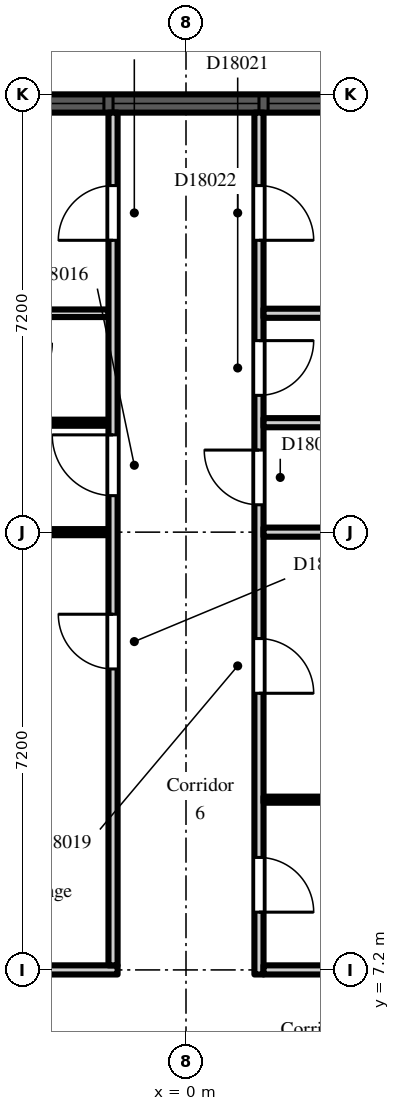
"""IFC4 building model, lengths in metres.
Left out: names, types, materials, properties, quantities, classifications, styles, units other than length and angle.
Written with IfcOpenShell. Run it as: python <this file> out.ifc"""

import sys

from ifc_helpers import new_model, si_unit, direction, frame, frame_2d, origin, place, context, subcontext, project, spatial, rectangle, extrude, element, fill, save


model = new_model("IFC4")
c1 = context("Model", 3, precision=1e-05, world=origin(), true_north=direction((0.0, 1.0)))
c2 = subcontext(c1, "Body", "Model", "MODEL_VIEW")
j1 = project(units=[si_unit("LENGTHUNIT", "METRE"), si_unit("PLANEANGLEUNIT", "RADIAN")], contexts=[c1])
p1 = place(None, origin())
s1 = spatial("IfcSite", under=j1, at=p1, CompositionType="ELEMENT")
p2 = place(p1, origin())
s2 = spatial("IfcBuilding", under=s1, at=p2, CompositionType="ELEMENT")
p3 = place(p2, frame((0.0, 0.0, 120.3)))
s3 = spatial("IfcBuildingStorey", under=s2, at=p3, CompositionType="ELEMENT", Elevation=120.3)
p4 = place(p3, frame((2.7, 21.45, 0.0), z_axis=(0.0, 0.0, 1.0), x_axis=(-1.0, 0.0, 0.0)))
e1 = element("IfcWall", 1, at=p4, inside=s3, PredefinedType="SOLIDWALL", context=c2, shape_type="SweptSolid", body=[
    extrude(rectangle(XDim=5.4, YDim=0.3, at=frame_2d((2.7, 0.0))), origin(), (0.0, 0.0, 1.0), 2.2),
])
p5 = place(p4, frame((1.5, 0.0, 0.2)))
e2 = element("IfcOpeningElement", 2, at=p5, cuts=e1, PredefinedType="OPENING", context=c2, shape_type="SweptSolid", body=[
    extrude(rectangle(XDim=2.4, YDim=1.85, at=frame_2d((1.2, 0.925))), frame((0.0, 0.16, 0.0), z_axis=(0.0, -1.0, 0.0), x_axis=(1.0, 0.0, 0.0)), (0.0, 0.0, 1.0), 0.32),
])
p6 = place(p4, frame((0.15, 0.0, 0.2)))
e3 = element("IfcOpeningElement", 3, at=p6, cuts=e1, PredefinedType="OPENING", context=c2, shape_type="SweptSolid", body=[
    extrude(rectangle(XDim=1.2, YDim=1.85, at=frame_2d((0.6, 0.925))), frame((0.0, 0.16, 0.0), z_axis=(0.0, -1.0, 0.0), x_axis=(1.0, 0.0, 0.0)), (0.0, 0.0, 1.0), 0.32),
])
p7 = place(p4, frame((4.05, 0.0, 0.2)))
e4 = element("IfcOpeningElement", 4, at=p7, cuts=e1, PredefinedType="OPENING", context=c2, shape_type="SweptSolid", body=[
    extrude(rectangle(XDim=1.2, YDim=1.85, at=frame_2d((0.6, 0.925))), frame((0.0, 0.16, 0.0), z_axis=(0.0, -1.0, 0.0), x_axis=(1.0, 0.0, 0.0)), (0.0, 0.0, 1.0), 0.32),
])
p8 = place(p3, frame((-3.9, 7.2, 0.0), z_axis=(0.0, 0.0, 1.0), x_axis=(1.0, 0.0, 0.0)))
e5 = element("IfcWall", 5, at=p8, inside=s3, PredefinedType="PARTITIONING", context=c2, shape_type="SweptSolid", body=[
    extrude(rectangle(XDim=2.775, YDim=0.15, at=frame_2d((1.387, 0.0))), origin(), (0.0, 0.0, 1.0), 2.6),
])
p9 = place(p3, frame((-3.9, 14.4, 0.0), z_axis=(0.0, 0.0, 1.0), x_axis=(1.0, 0.0, 0.0)))
e6 = element("IfcWall", 6, at=p9, inside=s3, PredefinedType="PARTITIONING", context=c2, shape_type="SweptSolid", body=[
    extrude(rectangle(XDim=2.625, YDim=0.1, at=frame_2d((1.312, 0.0))), origin(), (0.0, 0.0, 1.0), 2.6),
])
p10 = place(p3, frame((-2.95, 16.2, 0.0), z_axis=(0.0, 0.0, 1.0), x_axis=(1.0, 0.0, 0.0)))
e7 = element("IfcWall", 7, at=p10, inside=s3, PredefinedType="PARTITIONING", context=c2, shape_type="SweptSolid", body=[
    extrude(rectangle(XDim=1.675, YDim=0.1, at=frame_2d((0.837, 0.0))), origin(), (0.0, 0.0, 1.0), 2.6),
])
p11 = place(p3, frame((-3.0, 18.0, 0.0), z_axis=(0.0, 0.0, 1.0), x_axis=(1.0, 0.0, 0.0)))
e8 = element("IfcWall", 8, at=p11, inside=s3, PredefinedType="PARTITIONING", context=c2, shape_type="SweptSolid", body=[
    extrude(rectangle(XDim=1.725, YDim=0.125, at=frame_2d((0.863, 0.0))), origin(), (0.0, 0.0, 1.0), 2.6),
])
p12 = place(p3, frame((-1.2, 7.275, 0.0), z_axis=(0.0, 0.0, 1.0), x_axis=(0.0, 1.0, 0.0)))
e9 = element("IfcWall", 9, at=p12, inside=s3, PredefinedType="PARTITIONING", context=c2, shape_type="SweptSolid", body=[
    extrude(rectangle(XDim=14.025, YDim=0.15, at=frame_2d((7.013, 0.0))), origin(), (0.0, 0.0, 1.0), 2.6),
])
p13 = place(p12, frame((4.875, 0.0, 0.0)))
e10 = element("IfcOpeningElement", 10, at=p13, cuts=e9, PredefinedType="OPENING", context=c2, shape_type="SweptSolid", body=[
    extrude(rectangle(XDim=0.9, YDim=2.1, at=frame_2d((0.45, 1.05))), frame((0.0, 0.085, 0.0), z_axis=(0.0, -1.0, 0.0), x_axis=(1.0, 0.0, 0.0)), (0.0, 0.0, 1.0), 0.17),
])
p14 = place(p12, frame((7.725, 0.0, 0.0)))
e11 = element("IfcOpeningElement", 11, at=p14, cuts=e9, PredefinedType="OPENING", context=c2, shape_type="SweptSolid", body=[
    extrude(rectangle(XDim=1.0, YDim=2.1, at=frame_2d((0.5, 1.05))), frame((0.0, 0.085, 0.0), z_axis=(0.0, -1.0, 0.0), x_axis=(1.0, 0.0, 0.0)), (0.0, 0.0, 1.0), 0.17),
])
p15 = place(p12, frame((11.925, 0.0, 0.0)))
e12 = element("IfcOpeningElement", 12, at=p15, cuts=e9, PredefinedType="OPENING", context=c2, shape_type="SweptSolid", body=[
    extrude(rectangle(XDim=0.9, YDim=2.1, at=frame_2d((0.45, 1.05))), frame((0.0, 0.085, 0.0), z_axis=(0.0, -1.0, 0.0), x_axis=(1.0, 0.0, 0.0)), (0.0, 0.0, 1.0), 0.17),
])
p16 = place(p3, frame((1.2, 7.125, 0.0), z_axis=(0.0, 0.0, 1.0), x_axis=(0.0, 1.0, 0.0)))
e13 = element("IfcWall", 13, at=p16, inside=s3, PredefinedType="PARTITIONING", context=c2, shape_type="SweptSolid", body=[
    extrude(rectangle(XDim=14.175, YDim=0.15, at=frame_2d((7.087, 0.0))), origin(), (0.0, 0.0, 1.0), 2.6),
])
p17 = place(p16, frame((1.025, 0.0, 0.0)))
e14 = element("IfcOpeningElement", 14, at=p17, cuts=e13, PredefinedType="OPENING", context=c2, shape_type="SweptSolid", body=[
    extrude(rectangle(XDim=0.9, YDim=2.1, at=frame_2d((0.45, 1.05))), frame((0.0, 0.085, 0.0), z_axis=(0.0, -1.0, 0.0), x_axis=(1.0, 0.0, 0.0)), (0.0, 0.0, 1.0), 0.17),
])
p18 = place(p16, frame((4.625, 0.0, 0.0)))
e15 = element("IfcOpeningElement", 15, at=p18, cuts=e13, PredefinedType="OPENING", context=c2, shape_type="SweptSolid", body=[
    extrude(rectangle(XDim=0.9, YDim=2.1, at=frame_2d((0.45, 1.05))), frame((0.0, 0.085, 0.0), z_axis=(0.0, -1.0, 0.0), x_axis=(1.0, 0.0, 0.0)), (0.0, 0.0, 1.0), 0.17),
])
p19 = place(p16, frame((7.725, 0.0, 0.0)))
e16 = element("IfcOpeningElement", 16, at=p19, cuts=e13, PredefinedType="OPENING", context=c2, shape_type="SweptSolid", body=[
    extrude(rectangle(XDim=0.9, YDim=2.1, at=frame_2d((0.45, 1.05))), frame((0.0, 0.085, 0.0), z_axis=(0.0, -1.0, 0.0), x_axis=(1.0, 0.0, 0.0)), (0.0, 0.0, 1.0), 0.17),
])
p20 = place(p16, frame((9.525, 0.0, 0.0)))
e17 = element("IfcOpeningElement", 17, at=p20, cuts=e13, PredefinedType="OPENING", context=c2, shape_type="SweptSolid", body=[
    extrude(rectangle(XDim=0.9, YDim=2.1, at=frame_2d((0.45, 1.05))), frame((0.0, 0.085, 0.0), z_axis=(0.0, -1.0, 0.0), x_axis=(1.0, 0.0, 0.0)), (0.0, 0.0, 1.0), 0.17),
])
p21 = place(p16, frame((12.075, 0.0, 0.0)))
e18 = element("IfcOpeningElement", 18, at=p21, cuts=e13, PredefinedType="OPENING", context=c2, shape_type="SweptSolid", body=[
    extrude(rectangle(XDim=0.9, YDim=2.1, at=frame_2d((0.45, 1.05))), frame((0.0, 0.085, 0.0), z_axis=(0.0, -1.0, 0.0), x_axis=(1.0, 0.0, 0.0)), (0.0, 0.0, 1.0), 0.17),
])
p22 = place(p3, frame((1.275, 7.2, 0.0), z_axis=(0.0, 0.0, 1.0), x_axis=(1.0, 0.0, 0.0)))
e19 = element("IfcWall", 19, at=p22, inside=s3, PredefinedType="PARTITIONING", context=c2, shape_type="SweptSolid", body=[
    extrude(rectangle(XDim=2.625, YDim=0.15, at=frame_2d((1.312, 0.0))), origin(), (0.0, 0.0, 1.0), 2.6),
])
p23 = place(p3, frame((1.275, 10.0, 0.0), z_axis=(0.0, 0.0, 1.0), x_axis=(1.0, 0.0, 0.0)))
e20 = element("IfcWall", 20, at=p23, inside=s3, PredefinedType="PARTITIONING", context=c2, shape_type="SweptSolid", body=[
    extrude(rectangle(XDim=2.625, YDim=0.1, at=frame_2d((1.312, 0.0))), origin(), (0.0, 0.0, 1.0), 2.6),
])
p24 = place(p3, frame((1.275, 14.4, 0.0), z_axis=(0.0, 0.0, 1.0), x_axis=(1.0, 0.0, 0.0)))
e21 = element("IfcWall", 21, at=p24, inside=s3, PredefinedType="PARTITIONING", context=c2, shape_type="SweptSolid", body=[
    extrude(rectangle(XDim=2.625, YDim=0.15, at=frame_2d((1.312, 0.0))), origin(), (0.0, 0.0, 1.0), 2.6),
])
p25 = place(p3, frame((1.275, 16.2, 0.0), z_axis=(0.0, 0.0, 1.0), x_axis=(1.0, 0.0, 0.0)))
e22 = element("IfcWall", 22, at=p25, inside=s3, PredefinedType="PARTITIONING", context=c2, shape_type="SweptSolid", body=[
    extrude(rectangle(XDim=5.625, YDim=0.15, at=frame_2d((2.812, 0.0))), origin(), (0.0, 0.0, 1.0), 2.6),
])
p26 = place(p3, frame((1.275, 18.0, 0.0), z_axis=(0.0, 0.0, 1.0), x_axis=(1.0, 0.0, 0.0)))
e23 = element("IfcWall", 23, at=p26, inside=s3, PredefinedType="PARTITIONING", context=c2, shape_type="SweptSolid", body=[
    extrude(rectangle(XDim=3.825, YDim=0.15, at=frame_2d((1.913, 0.0))), origin(), (0.0, 0.0, 1.0), 2.6),
])
p27 = place(p5, origin())
e24 = element("IfcWindow", 24, at=p27, inside=s3, PartitioningType="SINGLE_PANEL", PredefinedType="WINDOW", context=c2, shape_type="SweptSolid", body=[
    extrude(rectangle(XDim=2.4, YDim=1.85, at=frame_2d((1.2, 0.925))), frame((0.0, 0.03, 0.0), z_axis=(0.0, -1.0, 0.0), x_axis=(1.0, 0.0, 0.0)), (0.0, 0.0, 1.0), 0.06),
])
fill(e2, e24)
p28 = place(p6, origin())
e25 = element("IfcWindow", 25, at=p28, inside=s3, PartitioningType="SINGLE_PANEL", PredefinedType="WINDOW", context=c2, shape_type="SweptSolid", body=[
    extrude(rectangle(XDim=1.2, YDim=1.85, at=frame_2d((0.6, 0.925))), frame((0.0, 0.03, 0.0), z_axis=(0.0, -1.0, 0.0), x_axis=(1.0, 0.0, 0.0)), (0.0, 0.0, 1.0), 0.06),
])
fill(e3, e25)
p29 = place(p7, origin())
e26 = element("IfcWindow", 26, at=p29, inside=s3, PartitioningType="SINGLE_PANEL", PredefinedType="WINDOW", context=c2, shape_type="SweptSolid", body=[
    extrude(rectangle(XDim=1.2, YDim=1.85, at=frame_2d((0.6, 0.925))), frame((0.0, 0.03, 0.0), z_axis=(0.0, -1.0, 0.0), x_axis=(1.0, 0.0, 0.0)), (0.0, 0.0, 1.0), 0.06),
])
fill(e4, e26)
p30 = place(p13, origin())
e27 = element("IfcDoor", 27, at=p30, inside=s3, OperationType="SINGLE_SWING_RIGHT", PredefinedType="DOOR", context=c2, shape_type="SweptSolid", body=[
    extrude(rectangle(XDim=0.9, YDim=2.1, at=frame_2d((0.45, 1.05))), frame((0.0, 0.025, 0.0), z_axis=(0.0, -1.0, 0.0), x_axis=(1.0, 0.0, 0.0)), (0.0, 0.0, 1.0), 0.05),
])
fill(e10, e27)
p31 = place(p14, origin())
e28 = element("IfcDoor", 28, at=p31, inside=s3, OperationType="SINGLE_SWING_RIGHT", PredefinedType="DOOR", context=c2, shape_type="SweptSolid", body=[
    extrude(rectangle(XDim=1.0, YDim=2.1, at=frame_2d((0.5, 1.05))), frame((0.0, 0.025, 0.0), z_axis=(0.0, -1.0, 0.0), x_axis=(1.0, 0.0, 0.0)), (0.0, 0.0, 1.0), 0.05),
])
fill(e11, e28)
p32 = place(p15, origin())
e29 = element("IfcDoor", 29, at=p32, inside=s3, OperationType="SINGLE_SWING_LEFT", PredefinedType="DOOR", context=c2, shape_type="SweptSolid", body=[
    extrude(rectangle(XDim=0.9, YDim=2.1, at=frame_2d((0.45, 1.05))), frame((0.0, 0.025, 0.0), z_axis=(0.0, -1.0, 0.0), x_axis=(1.0, 0.0, 0.0)), (0.0, 0.0, 1.0), 0.05),
])
fill(e12, e29)
p33 = place(p17, frame((0.9, 0.0, 0.0), z_axis=(0.0, 0.0, 1.0), x_axis=(-1.0, 0.0, 0.0)))
e30 = element("IfcDoor", 30, at=p33, inside=s3, OperationType="SINGLE_SWING_RIGHT", PredefinedType="DOOR", context=c2, shape_type="SweptSolid", body=[
    extrude(rectangle(XDim=0.9, YDim=2.1, at=frame_2d((0.45, 1.05))), frame((0.0, 0.025, 0.0), z_axis=(0.0, -1.0, 0.0), x_axis=(1.0, 0.0, 0.0)), (0.0, 0.0, 1.0), 0.05),
])
fill(e14, e30)
p34 = place(p18, frame((0.9, 0.0, 0.0), z_axis=(0.0, 0.0, 1.0), x_axis=(-1.0, 0.0, 0.0)))
e31 = element("IfcDoor", 31, at=p34, inside=s3, OperationType="SINGLE_SWING_RIGHT", PredefinedType="DOOR", context=c2, shape_type="SweptSolid", body=[
    extrude(rectangle(XDim=0.9, YDim=2.1, at=frame_2d((0.45, 1.05))), frame((0.0, 0.025, 0.0), z_axis=(0.0, -1.0, 0.0), x_axis=(1.0, 0.0, 0.0)), (0.0, 0.0, 1.0), 0.05),
])
fill(e15, e31)
p35 = place(p19, origin())
e32 = element("IfcDoor", 32, at=p35, inside=s3, OperationType="SINGLE_SWING_RIGHT", PredefinedType="DOOR", context=c2, shape_type="SweptSolid", body=[
    extrude(rectangle(XDim=0.9, YDim=2.1, at=frame_2d((0.45, 1.05))), frame((0.0, 0.025, 0.0), z_axis=(0.0, -1.0, 0.0), x_axis=(1.0, 0.0, 0.0)), (0.0, 0.0, 1.0), 0.05),
])
fill(e16, e32)
p36 = place(p20, frame((0.9, 0.0, 0.0), z_axis=(0.0, 0.0, 1.0), x_axis=(-1.0, 0.0, 0.0)))
e33 = element("IfcDoor", 33, at=p36, inside=s3, OperationType="SINGLE_SWING_LEFT", PredefinedType="DOOR", context=c2, shape_type="SweptSolid", body=[
    extrude(rectangle(XDim=0.9, YDim=2.1, at=frame_2d((0.45, 1.05))), frame((0.0, 0.025, 0.0), z_axis=(0.0, -1.0, 0.0), x_axis=(1.0, 0.0, 0.0)), (0.0, 0.0, 1.0), 0.05),
])
fill(e17, e33)
p37 = place(p21, frame((0.9, 0.0, 0.0), z_axis=(0.0, 0.0, 1.0), x_axis=(-1.0, 0.0, 0.0)))
e34 = element("IfcDoor", 34, at=p37, inside=s3, OperationType="SINGLE_SWING_RIGHT", PredefinedType="DOOR", context=c2, shape_type="SweptSolid", body=[
    extrude(rectangle(XDim=0.9, YDim=2.1, at=frame_2d((0.45, 1.05))), frame((0.0, 0.025, 0.0), z_axis=(0.0, -1.0, 0.0), x_axis=(1.0, 0.0, 0.0)), (0.0, 0.0, 1.0), 0.05),
])
fill(e18, e34)
save(model, sys.argv[1])
